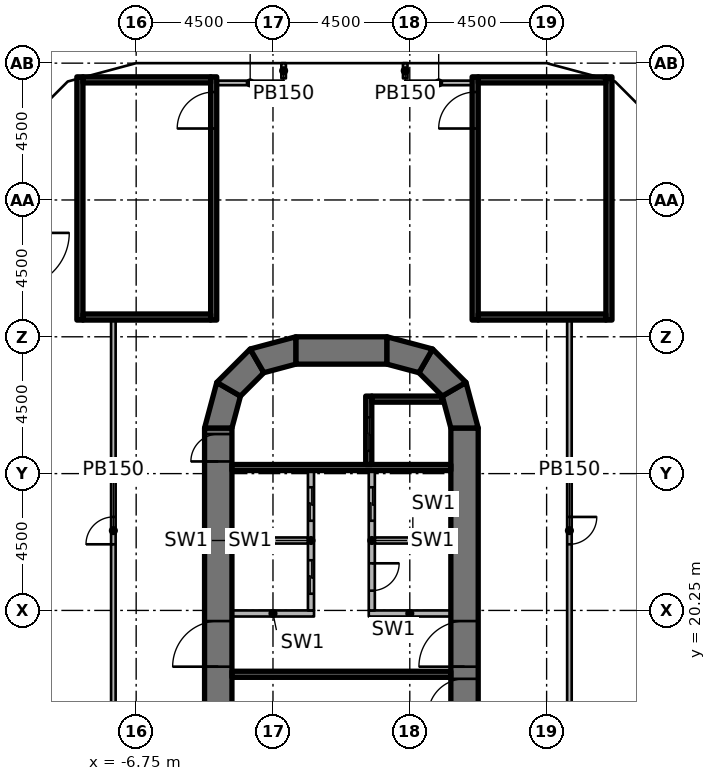
"""IFC4 building model, lengths in metres.
Left out: names, types, materials, properties, quantities, classifications, styles, units other than length and angle.
Written with IfcOpenShell. Run it as: python <this file> out.ifc"""

import sys

from ifc_helpers import new_model, si_unit, direction, frame, frame_2d, origin, origin_2d, place, context, subcontext, project, spatial, polyline, rectangle, outline, extrude, element, fill, save


model = new_model("IFC4")
c1 = context("Model", 3, precision=1e-05, world=origin(), true_north=direction((0.0, 1.0)))
c2 = subcontext(c1, "Body", "Model", "MODEL_VIEW")
j1 = project(units=[si_unit("LENGTHUNIT", "METRE"), si_unit("PLANEANGLEUNIT", "RADIAN")], contexts=[c1])
p1 = place(None, origin())
s1 = spatial("IfcSite", under=j1, at=p1, CompositionType="ELEMENT")
p2 = place(p1, origin())
s2 = spatial("IfcBuilding", under=s1, at=p2, CompositionType="ELEMENT")
p3 = place(p2, frame((0.0, 0.0, 22.0)))
s3 = spatial("IfcBuildingStorey", under=s2, at=p3, CompositionType="ELEMENT", Elevation=22.0)
for number, where, z_axis, x_axis in (
    (1, (-6.25, 20.25, 0.0), (0.0, 0.0, 1.0), (1.0, 0.0, 0.0)),
    (2, (-6.25, 24.65, 0.0), (0.0, 0.0, 1.0), (1.0, 0.0, 0.0)),
    (3, (-6.25, 26.7, 0.0), (0.0, 0.0, 1.0), (1.0, 0.0, 0.0)),
    (4, (-2.25, 33.11, 0.0), (0.0, 0.0, 1.0), (1.0, 0.0, 0.0)),
    (5, (2.25, 33.11, 0.0), (0.0, 0.0, 1.0), (1.0, 0.0, 0.0)),
    (6, (6.25, 20.25, 0.0), (0.0, 0.0, 1.0), (1.0, 0.0, 0.0)),
    (7, (6.25, 24.65, 0.0), (0.0, 0.0, 1.0), (1.0, 0.0, 0.0)),
    (8, (6.25, 26.7, 0.0), (0.0, 0.0, 1.0), (1.0, 0.0, 0.0)),
):
    element("IfcColumn", number, at=place(p3, frame(where, z_axis=z_axis, x_axis=x_axis)), inside=s3, PredefinedType="COLUMN", context=c2, shape_type="SweptSolid", body=[
        extrude(rectangle(XDim=1.2, YDim=1.2, at=origin_2d()), origin(), (0.0, 0.0, 1.0), 4.85),
    ])
p4 = place(p3, frame((-4.05, 11.25, 0.0), z_axis=(0.0, 0.0, 1.0), x_axis=(0.0, 1.0, 0.0)))
e9 = element("IfcWall", 9, at=p4, inside=s3, PredefinedType="SHEAR", context=c2, shape_type="SweptSolid", body=[
    extrude(rectangle(XDim=15.0, YDim=0.9, at=frame_2d((7.5, 0.0))), origin(), (0.0, 0.0, 1.0), 5.0),
])
p5 = place(p4, frame((7.15, 0.0, 0.0)))
e10 = element("IfcOpeningElement", 10, at=p5, cuts=e9, PredefinedType="OPENING", context=c2, shape_type="SweptSolid", body=[
    extrude(rectangle(XDim=1.5, YDim=2.3, at=frame_2d((0.75, 1.15))), frame((0.0, 0.46, 0.0), z_axis=(0.0, -1.0, 0.0), x_axis=(1.0, 0.0, 0.0)), (0.0, 0.0, 1.0), 0.92),
])
p6 = place(p4, frame((13.9, 0.0, 0.0)))
e11 = element("IfcOpeningElement", 11, at=p6, cuts=e9, PredefinedType="OPENING", context=c2, shape_type="SweptSolid", body=[
    extrude(rectangle(XDim=0.9, YDim=2.1, at=frame_2d((0.45, 1.05))), frame((0.0, 0.46, 0.0), z_axis=(0.0, -1.0, 0.0), x_axis=(1.0, 0.0, 0.0)), (0.0, 0.0, 1.0), 0.92),
])
p7 = place(p4, frame((1.15, 0.0, 0.0)))
e12 = element("IfcOpeningElement", 12, at=p7, cuts=e9, PredefinedType="OPENING", context=c2, shape_type="SweptSolid", body=[
    extrude(rectangle(XDim=1.2, YDim=2.1, at=frame_2d((0.6, 1.05))), frame((0.0, 0.46, 0.0), z_axis=(0.0, -1.0, 0.0), x_axis=(1.0, 0.0, 0.0)), (0.0, 0.0, 1.0), 0.92),
])
p8 = place(p3, frame((4.05, 11.25, 0.0), z_axis=(0.0, 0.0, 1.0), x_axis=(0.0, 1.0, 0.0)))
e13 = element("IfcWall", 13, at=p8, inside=s3, PredefinedType="SHEAR", context=c2, shape_type="SweptSolid", body=[
    extrude(rectangle(XDim=15.0, YDim=0.9, at=frame_2d((7.5, 0.0))), origin(), (0.0, 0.0, 1.0), 5.0),
])
p9 = place(p8, frame((7.15, 0.0, 0.0)))
e14 = element("IfcOpeningElement", 14, at=p9, cuts=e13, PredefinedType="OPENING", context=c2, shape_type="SweptSolid", body=[
    extrude(rectangle(XDim=1.5, YDim=2.3, at=frame_2d((0.75, 1.15))), frame((0.0, 0.46, 0.0), z_axis=(0.0, -1.0, 0.0), x_axis=(1.0, 0.0, 0.0)), (0.0, 0.0, 1.0), 0.92),
])
p10 = place(p8, frame((5.55, 0.0, 0.0)))
e15 = element("IfcOpeningElement", 15, at=p10, cuts=e13, PredefinedType="OPENING", context=c2, shape_type="SweptSolid", body=[
    extrude(rectangle(XDim=1.2, YDim=2.1, at=frame_2d((0.6, 1.05))), frame((0.0, 0.46, 0.0), z_axis=(0.0, -1.0, 0.0), x_axis=(1.0, 0.0, 0.0)), (0.0, 0.0, 1.0), 0.92),
])
p11 = place(p3, frame((-1.5, 28.8, 0.0), z_axis=(0.0, 0.0, 1.0), x_axis=(1.0, 0.0, 0.0)))
e16 = element("IfcWall", 16, at=p11, inside=s3, PredefinedType="SHEAR", context=c2, shape_type="SweptSolid", body=[
    extrude(rectangle(XDim=3.0, YDim=0.9, at=frame_2d((1.5, 0.0))), origin(), (0.0, 0.0, 1.0), 5.0),
])
p12 = place(p3, origin())
e17 = element("IfcWall", 17, at=p12, inside=s3, PredefinedType="SHEAR", context=c2, shape_type="SweptSolid", body=[
    extrude(outline(polyline([(-4.5, 26.25), (-4.098, 27.75), (-3.319, 27.3), (-3.6, 26.25), (-4.5, 26.25)])), origin(), (0.0, 0.0, 1.0), 5.0),
])
p13 = place(p3, origin())
e18 = element("IfcWall", 18, at=p13, inside=s3, PredefinedType="SHEAR", context=c2, shape_type="SweptSolid", body=[
    extrude(outline(polyline([(-4.098, 27.75), (-3.0, 28.848), (-2.55, 28.069), (-3.319, 27.3), (-4.098, 27.75)])), origin(), (0.0, 0.0, 1.0), 5.0),
])
p14 = place(p3, origin())
e19 = element("IfcWall", 19, at=p14, inside=s3, PredefinedType="SHEAR", context=c2, shape_type="SweptSolid", body=[
    extrude(outline(polyline([(-3.0, 28.848), (-1.5, 29.25), (-1.5, 28.35), (-2.55, 28.069), (-3.0, 28.848)])), origin(), (0.0, 0.0, 1.0), 5.0),
])
p15 = place(p3, origin())
e20 = element("IfcWall", 20, at=p15, inside=s3, PredefinedType="SHEAR", context=c2, shape_type="SweptSolid", body=[
    extrude(outline(polyline([(4.5, 26.25), (4.098, 27.75), (3.319, 27.3), (3.6, 26.25), (4.5, 26.25)])), origin(), (0.0, 0.0, 1.0), 5.0),
])
p16 = place(p3, origin())
e21 = element("IfcWall", 21, at=p16, inside=s3, PredefinedType="SHEAR", context=c2, shape_type="SweptSolid", body=[
    extrude(outline(polyline([(4.098, 27.75), (3.0, 28.848), (2.55, 28.069), (3.319, 27.3), (4.098, 27.75)])), origin(), (0.0, 0.0, 1.0), 5.0),
])
p17 = place(p3, origin())
e22 = element("IfcWall", 22, at=p17, inside=s3, PredefinedType="SHEAR", context=c2, shape_type="SweptSolid", body=[
    extrude(outline(polyline([(3.0, 28.848), (1.5, 29.25), (1.5, 28.35), (2.55, 28.069), (3.0, 28.848)])), origin(), (0.0, 0.0, 1.0), 5.0),
])
p18 = place(p3, frame((-3.6, 24.95, 0.0), z_axis=(0.0, 0.0, 1.0), x_axis=(1.0, 0.0, 0.0)))
e23 = element("IfcWall", 23, at=p18, inside=s3, PredefinedType="SHEAR", context=c2, shape_type="SweptSolid", body=[
    extrude(rectangle(XDim=7.2, YDim=0.2, at=frame_2d((3.6, 0.0))), origin(), (0.0, 0.0, 1.0), 4.85),
])
p19 = place(p3, frame((0.9, 27.3, 0.0), z_axis=(0.0, 0.0, 1.0), x_axis=(0.0, -1.0, 0.0)))
e24 = element("IfcWall", 24, at=p19, inside=s3, PredefinedType="SHEAR", context=c2, shape_type="SweptSolid", body=[
    extrude(rectangle(XDim=2.25, YDim=0.2, at=frame_2d((1.125, 0.0))), origin(), (0.0, 0.0, 1.0), 4.85),
])
p20 = place(p19, frame((0.7, 0.0, 0.0)))
e25 = element("IfcOpeningElement", 25, at=p20, cuts=e24, PredefinedType="OPENING", context=c2, shape_type="SweptSolid", body=[
    extrude(rectangle(XDim=1.1, YDim=2.3, at=frame_2d((0.55, 1.15))), frame((0.0, 0.11, 0.0), z_axis=(0.0, -1.0, 0.0), x_axis=(1.0, 0.0, 0.0)), (0.0, 0.0, 1.0), 0.22),
])
p21 = place(p3, origin())
e26 = element("IfcWall", 26, at=p21, inside=s3, PredefinedType="SHEAR", context=c2, shape_type="SweptSolid", body=[
    extrude(outline(polyline([(1.0, 27.1), (3.341, 27.1), (3.291, 27.284), (3.275, 27.3), (1.0, 27.3), (1.0, 27.1)])), origin(), (0.0, 0.0, 1.0), 4.85),
])
p22 = place(p3, frame((-3.6, 18.15, 0.0), z_axis=(0.0, 0.0, 1.0), x_axis=(1.0, 0.0, 0.0)))
e27 = element("IfcWall", 27, at=p22, inside=s3, PredefinedType="SHEAR", context=c2, shape_type="SweptSolid", body=[
    extrude(rectangle(XDim=7.2, YDim=0.2, at=frame_2d((3.6, 0.0))), origin(), (0.0, 0.0, 1.0), 4.85),
])
p23 = place(p3, frame((-3.6, 20.15, 0.0), z_axis=(0.0, 0.0, 1.0), x_axis=(1.0, 0.0, 0.0)))
e28 = element("IfcWall", 28, at=p23, inside=s3, PredefinedType="PARTITIONING", context=c2, shape_type="SweptSolid", body=[
    extrude(rectangle(XDim=2.7, YDim=0.2, at=frame_2d((1.35, 0.0))), origin(), (0.0, 0.0, 1.0), 4.85),
])
p24 = place(p3, frame((-1.0, 24.85, 0.0), z_axis=(0.0, 0.0, 1.0), x_axis=(0.0, -1.0, 0.0)))
e29 = element("IfcWall", 29, at=p24, inside=s3, PredefinedType="PARTITIONING", context=c2, shape_type="SweptSolid", body=[
    extrude(rectangle(XDim=4.6, YDim=0.2, at=frame_2d((2.3, 0.0))), origin(), (0.0, 0.0, 1.0), 4.85),
])
p25 = place(p24, frame((0.55, 0.0, 0.0)))
e30 = element("IfcOpeningElement", 30, at=p25, cuts=e29, PredefinedType="OPENING", context=c2, shape_type="SweptSolid", body=[
    extrude(rectangle(XDim=1.1, YDim=2.3, at=frame_2d((0.55, 1.15))), frame((0.0, 0.11, 0.0), z_axis=(0.0, -1.0, 0.0), x_axis=(1.0, 0.0, 0.0)), (0.0, 0.0, 1.0), 0.22),
])
p26 = place(p24, frame((2.95, 0.0, 0.0)))
e31 = element("IfcOpeningElement", 31, at=p26, cuts=e29, PredefinedType="OPENING", context=c2, shape_type="SweptSolid", body=[
    extrude(rectangle(XDim=1.1, YDim=2.3, at=frame_2d((0.55, 1.15))), frame((0.0, 0.11, 0.0), z_axis=(0.0, -1.0, 0.0), x_axis=(1.0, 0.0, 0.0)), (0.0, 0.0, 1.0), 0.22),
])
p27 = place(p3, frame((0.9, 20.15, 0.0), z_axis=(0.0, 0.0, 1.0), x_axis=(1.0, 0.0, 0.0)))
e32 = element("IfcWall", 32, at=p27, inside=s3, PredefinedType="PARTITIONING", context=c2, shape_type="SweptSolid", body=[
    extrude(rectangle(XDim=2.7, YDim=0.2, at=frame_2d((1.35, 0.0))), origin(), (0.0, 0.0, 1.0), 4.85),
])
p28 = place(p3, frame((1.0, 24.85, 0.0), z_axis=(0.0, 0.0, 1.0), x_axis=(0.0, -1.0, 0.0)))
e33 = element("IfcWall", 33, at=p28, inside=s3, PredefinedType="PARTITIONING", context=c2, shape_type="SweptSolid", body=[
    extrude(rectangle(XDim=4.6, YDim=0.2, at=frame_2d((2.3, 0.0))), origin(), (0.0, 0.0, 1.0), 4.85),
])
p29 = place(p28, frame((0.55, 0.0, 0.0)))
e34 = element("IfcOpeningElement", 34, at=p29, cuts=e33, PredefinedType="OPENING", context=c2, shape_type="SweptSolid", body=[
    extrude(rectangle(XDim=1.1, YDim=2.3, at=frame_2d((0.55, 1.15))), frame((0.0, 0.11, 0.0), z_axis=(0.0, -1.0, 0.0), x_axis=(1.0, 0.0, 0.0)), (0.0, 0.0, 1.0), 0.22),
])
p30 = place(p28, frame((3.05, 0.0, 0.0)))
e35 = element("IfcOpeningElement", 35, at=p30, cuts=e33, PredefinedType="OPENING", context=c2, shape_type="SweptSolid", body=[
    extrude(rectangle(XDim=0.9, YDim=2.1, at=frame_2d((0.45, 1.05))), frame((0.0, 0.11, 0.0), z_axis=(0.0, -1.0, 0.0), x_axis=(1.0, 0.0, 0.0)), (0.0, 0.0, 1.0), 0.22),
])
for number, where, z_axis, x_axis in (
    (36, (-3.6, 22.55, 0.0), (0.0, 0.0, 1.0), (1.0, 0.0, 0.0)),
    (37, (1.1, 22.55, 0.0), (0.0, 0.0, 1.0), (1.0, 0.0, 0.0)),
):
    element("IfcWall", number, at=place(p3, frame(where, z_axis=z_axis, x_axis=x_axis)), inside=s3, PredefinedType="PARTITIONING", context=c2, shape_type="SweptSolid", body=[
        extrude(rectangle(XDim=2.5, YDim=0.2, at=frame_2d((1.25, 0.0))), origin(), (0.0, 0.0, 1.0), 4.85),
    ])
p31 = place(p3, frame((-8.6, 29.8, 0.0), z_axis=(0.0, 0.0, 1.0), x_axis=(0.0, 1.0, 0.0)))
e38 = element("IfcWall", 38, at=p31, inside=s3, PredefinedType="SHEAR", context=c2, shape_type="SweptSolid", body=[
    extrude(rectangle(XDim=8.0, YDim=0.2, at=frame_2d((4.0, 0.0))), origin(), (0.0, 0.0, 1.0), 4.55),
])
p32 = place(p3, frame((-4.2, 29.8, 0.0), z_axis=(0.0, 0.0, 1.0), x_axis=(0.0, 1.0, 0.0)))
e39 = element("IfcWall", 39, at=p32, inside=s3, PredefinedType="SHEAR", context=c2, shape_type="SweptSolid", body=[
    extrude(rectangle(XDim=8.0, YDim=0.2, at=frame_2d((4.0, 0.0))), origin(), (0.0, 0.0, 1.0), 4.55),
])
p33 = place(p32, frame((6.3, 0.0, 0.0)))
e40 = element("IfcOpeningElement", 40, at=p33, cuts=e39, PredefinedType="OPENING", context=c2, shape_type="SweptSolid", body=[
    extrude(rectangle(XDim=1.2, YDim=2.1, at=frame_2d((0.6, 1.05))), frame((0.0, 0.11, 0.0), z_axis=(0.0, -1.0, 0.0), x_axis=(1.0, 0.0, 0.0)), (0.0, 0.0, 1.0), 0.22),
])
for number, where, z_axis, x_axis in (
    (41, (-8.5, 29.9, 0.0), (0.0, 0.0, 1.0), (1.0, 0.0, 0.0)),
    (42, (-8.5, 37.7, 0.0), (0.0, 0.0, 1.0), (1.0, 0.0, 0.0)),
):
    element("IfcWall", number, at=place(p3, frame(where, z_axis=z_axis, x_axis=x_axis)), inside=s3, PredefinedType="SHEAR", context=c2, shape_type="SweptSolid", body=[
        extrude(rectangle(XDim=4.2, YDim=0.2, at=frame_2d((2.1, 0.0))), origin(), (0.0, 0.0, 1.0), 4.55),
    ])
p34 = place(p3, frame((4.4, 29.8, 0.0), z_axis=(0.0, 0.0, 1.0), x_axis=(0.0, 1.0, 0.0)))
e43 = element("IfcWall", 43, at=p34, inside=s3, PredefinedType="SHEAR", context=c2, shape_type="SweptSolid", body=[
    extrude(rectangle(XDim=8.0, YDim=0.2, at=frame_2d((4.0, 0.0))), origin(), (0.0, 0.0, 1.0), 4.55),
])
p35 = place(p34, frame((6.3, 0.0, 0.0)))
e44 = element("IfcOpeningElement", 44, at=p35, cuts=e43, PredefinedType="OPENING", context=c2, shape_type="SweptSolid", body=[
    extrude(rectangle(XDim=1.2, YDim=2.1, at=frame_2d((0.6, 1.05))), frame((0.0, 0.11, 0.0), z_axis=(0.0, -1.0, 0.0), x_axis=(1.0, 0.0, 0.0)), (0.0, 0.0, 1.0), 0.22),
])
p36 = place(p3, frame((8.8, 29.8, 0.0), z_axis=(0.0, 0.0, 1.0), x_axis=(0.0, 1.0, 0.0)))
e45 = element("IfcWall", 45, at=p36, inside=s3, PredefinedType="SHEAR", context=c2, shape_type="SweptSolid", body=[
    extrude(rectangle(XDim=8.0, YDim=0.2, at=frame_2d((4.0, 0.0))), origin(), (0.0, 0.0, 1.0), 4.55),
])
for number, where, z_axis, x_axis in (
    (46, (4.5, 29.9, 0.0), (0.0, 0.0, 1.0), (1.0, 0.0, 0.0)),
    (47, (4.5, 37.7, 0.0), (0.0, 0.0, 1.0), (1.0, 0.0, 0.0)),
):
    element("IfcWall", number, at=place(p3, frame(where, z_axis=z_axis, x_axis=x_axis)), inside=s3, PredefinedType="SHEAR", context=c2, shape_type="SweptSolid", body=[
        extrude(rectangle(XDim=4.2, YDim=0.2, at=frame_2d((2.1, 0.0))), origin(), (0.0, 0.0, 1.0), 4.55),
    ])
p37 = place(p3, frame((-4.1, 37.6, 0.0), z_axis=(0.0, 0.0, 1.0), x_axis=(1.0, 0.0, 0.0)))
e48 = element("IfcWall", 48, at=p37, inside=s3, PredefinedType="PARTITIONING", context=c2, shape_type="SweptSolid", body=[
    extrude(rectangle(XDim=2.2, YDim=0.15, at=frame_2d((1.1, 0.0))), origin(), (0.0, 0.0, 1.0), 4.55),
])
p38 = place(p3, frame((2.1, 37.6, 0.0), z_axis=(0.0, 0.0, 1.0), x_axis=(1.0, 0.0, 0.0)))
e49 = element("IfcWall", 49, at=p38, inside=s3, PredefinedType="PARTITIONING", context=c2, shape_type="SweptSolid", body=[
    extrude(rectangle(XDim=2.2, YDim=0.15, at=frame_2d((1.1, 0.0))), origin(), (0.0, 0.0, 1.0), 4.55),
])
p39 = place(p3, frame((7.5, 30.0, 0.0), z_axis=(0.0, 0.0, 1.0), x_axis=(0.0, -1.0, 0.0)))
e50 = element("IfcWall", 50, at=p39, inside=s3, PredefinedType="PARTITIONING", context=c2, shape_type="SweptSolid", body=[
    extrude(rectangle(XDim=14.25, YDim=0.15, at=frame_2d((7.125, 0.0))), origin(), (0.0, 0.0, 1.0), 4.55),
])
p40 = place(p39, frame((6.675, 0.0, 0.0)))
e51 = element("IfcOpeningElement", 51, at=p40, cuts=e50, PredefinedType="OPENING", context=c2, shape_type="SweptSolid", body=[
    extrude(rectangle(XDim=0.9, YDim=2.1, at=frame_2d((0.45, 1.05))), frame((0.0, 0.085, 0.0), z_axis=(0.0, -1.0, 0.0), x_axis=(1.0, 0.0, 0.0)), (0.0, 0.0, 1.0), 0.17),
])
p41 = place(p3, frame((-7.5, 15.75, 0.0), z_axis=(0.0, 0.0, 1.0), x_axis=(0.0, 1.0, 0.0)))
e52 = element("IfcWall", 52, at=p41, inside=s3, PredefinedType="PARTITIONING", context=c2, shape_type="SweptSolid", body=[
    extrude(rectangle(XDim=14.25, YDim=0.15, at=frame_2d((7.125, 0.0))), origin(), (0.0, 0.0, 1.0), 4.55),
])
p42 = place(p41, frame((6.675, 0.0, 0.0)))
e53 = element("IfcOpeningElement", 53, at=p42, cuts=e52, PredefinedType="OPENING", context=c2, shape_type="SweptSolid", body=[
    extrude(rectangle(XDim=0.9, YDim=2.1, at=frame_2d((0.45, 1.05))), frame((0.0, 0.085, 0.0), z_axis=(0.0, -1.0, 0.0), x_axis=(1.0, 0.0, 0.0)), (0.0, 0.0, 1.0), 0.17),
])
for number, where, z_axis, x_axis in (
    (54, (2.1, 38.25, 0.0), (0.0, 0.0, 1.0), (0.0, -1.0, 0.0)),
    (55, (-1.9, 37.75, 0.0), (0.0, 0.0, 1.0), (0.0, 1.0, 0.0)),
):
    element("IfcWall", number, at=place(p3, frame(where, z_axis=z_axis, x_axis=x_axis)), inside=s3, PredefinedType="PARTITIONING", context=c2, shape_type="SweptSolid", body=[
        extrude(rectangle(XDim=0.5, YDim=0.15, at=frame_2d((0.25, 0.0))), origin(), (0.0, 0.0, 1.0), 4.55),
    ])
p43 = place(p5, origin())
e56 = element("IfcDoor", 56, at=p43, inside=s3, OperationType="DOUBLE_DOOR_SINGLE_SWING", PredefinedType="DOOR", context=c2, shape_type="SweptSolid", body=[
    extrude(rectangle(XDim=1.5, YDim=2.3, at=frame_2d((0.75, 1.15))), frame((0.0, 0.025, 0.0), z_axis=(0.0, -1.0, 0.0), x_axis=(1.0, 0.0, 0.0)), (0.0, 0.0, 1.0), 0.05),
])
fill(e10, e56)
p44 = place(p9, origin())
e57 = element("IfcDoor", 57, at=p44, inside=s3, OperationType="DOUBLE_DOOR_SINGLE_SWING", PredefinedType="DOOR", context=c2, shape_type="SweptSolid", body=[
    extrude(rectangle(XDim=1.5, YDim=2.3, at=frame_2d((0.75, 1.15))), frame((0.0, 0.025, 0.0), z_axis=(0.0, -1.0, 0.0), x_axis=(1.0, 0.0, 0.0)), (0.0, 0.0, 1.0), 0.05),
])
fill(e14, e57)
p45 = place(p6, origin())
e58 = element("IfcDoor", 58, at=p45, inside=s3, OperationType="SINGLE_SWING_RIGHT", PredefinedType="DOOR", context=c2, shape_type="SweptSolid", body=[
    extrude(rectangle(XDim=0.9, YDim=2.1, at=frame_2d((0.45, 1.05))), frame((0.0, 0.025, 0.0), z_axis=(0.0, -1.0, 0.0), x_axis=(1.0, 0.0, 0.0)), (0.0, 0.0, 1.0), 0.05),
])
fill(e11, e58)
p46 = place(p10, origin())
e59 = element("IfcDoor", 59, at=p46, inside=s3, OperationType="SINGLE_SWING_RIGHT", PredefinedType="DOOR", context=c2, shape_type="SweptSolid", body=[
    extrude(rectangle(XDim=1.2, YDim=2.1, at=frame_2d((0.6, 1.05))), frame((0.0, 0.025, 0.0), z_axis=(0.0, -1.0, 0.0), x_axis=(1.0, 0.0, 0.0)), (0.0, 0.0, 1.0), 0.05),
])
fill(e15, e59)
p47 = place(p20, origin())
e60 = element("IfcDoor", 60, at=p47, inside=s3, OperationType="DOUBLE_DOOR_SLIDING", PredefinedType="DOOR", context=c2, shape_type="SweptSolid", body=[
    extrude(rectangle(XDim=1.1, YDim=2.3, at=frame_2d((0.55, 1.15))), frame((0.0, 0.025, 0.0), z_axis=(0.0, -1.0, 0.0), x_axis=(1.0, 0.0, 0.0)), (0.0, 0.0, 1.0), 0.05),
])
fill(e25, e60)
p48 = place(p25, origin())
e61 = element("IfcDoor", 61, at=p48, inside=s3, OperationType="DOUBLE_DOOR_SLIDING", PredefinedType="DOOR", context=c2, shape_type="SweptSolid", body=[
    extrude(rectangle(XDim=1.1, YDim=2.3, at=frame_2d((0.55, 1.15))), frame((0.0, 0.025, 0.0), z_axis=(0.0, -1.0, 0.0), x_axis=(1.0, 0.0, 0.0)), (0.0, 0.0, 1.0), 0.05),
])
fill(e30, e61)
p49 = place(p26, origin())
e62 = element("IfcDoor", 62, at=p49, inside=s3, OperationType="DOUBLE_DOOR_SLIDING", PredefinedType="DOOR", context=c2, shape_type="SweptSolid", body=[
    extrude(rectangle(XDim=1.1, YDim=2.3, at=frame_2d((0.55, 1.15))), frame((0.0, 0.025, 0.0), z_axis=(0.0, -1.0, 0.0), x_axis=(1.0, 0.0, 0.0)), (0.0, 0.0, 1.0), 0.05),
])
fill(e31, e62)
p50 = place(p29, origin())
e63 = element("IfcDoor", 63, at=p50, inside=s3, OperationType="DOUBLE_DOOR_SLIDING", PredefinedType="DOOR", context=c2, shape_type="SweptSolid", body=[
    extrude(rectangle(XDim=1.1, YDim=2.3, at=frame_2d((0.55, 1.15))), frame((0.0, 0.025, 0.0), z_axis=(0.0, -1.0, 0.0), x_axis=(1.0, 0.0, 0.0)), (0.0, 0.0, 1.0), 0.05),
])
fill(e34, e63)
p51 = place(p30, origin())
e64 = element("IfcDoor", 64, at=p51, inside=s3, OperationType="SINGLE_SWING_RIGHT", PredefinedType="DOOR", context=c2, shape_type="SweptSolid", body=[
    extrude(rectangle(XDim=0.9, YDim=2.1, at=frame_2d((0.45, 1.05))), frame((0.0, 0.025, 0.0), z_axis=(0.0, -1.0, 0.0), x_axis=(1.0, 0.0, 0.0)), (0.0, 0.0, 1.0), 0.05),
])
fill(e35, e64)
p52 = place(p33, origin())
e65 = element("IfcDoor", 65, at=p52, inside=s3, OperationType="SINGLE_SWING_RIGHT", PredefinedType="DOOR", context=c2, shape_type="SweptSolid", body=[
    extrude(rectangle(XDim=1.2, YDim=2.1, at=frame_2d((0.6, 1.05))), frame((0.0, 0.025, 0.0), z_axis=(0.0, -1.0, 0.0), x_axis=(1.0, 0.0, 0.0)), (0.0, 0.0, 1.0), 0.05),
])
fill(e40, e65)
p53 = place(p35, origin())
e66 = element("IfcDoor", 66, at=p53, inside=s3, OperationType="SINGLE_SWING_LEFT", PredefinedType="DOOR", context=c2, shape_type="SweptSolid", body=[
    extrude(rectangle(XDim=1.2, YDim=2.1, at=frame_2d((0.6, 1.05))), frame((0.0, 0.025, 0.0), z_axis=(0.0, -1.0, 0.0), x_axis=(1.0, 0.0, 0.0)), (0.0, 0.0, 1.0), 0.05),
])
fill(e44, e66)
p54 = place(p40, origin())
e67 = element("IfcDoor", 67, at=p54, inside=s3, OperationType="SINGLE_SWING_LEFT", PredefinedType="DOOR", context=c2, shape_type="SweptSolid", body=[
    extrude(rectangle(XDim=0.9, YDim=2.1, at=frame_2d((0.45, 1.05))), frame((0.0, 0.025, 0.0), z_axis=(0.0, -1.0, 0.0), x_axis=(1.0, 0.0, 0.0)), (0.0, 0.0, 1.0), 0.05),
])
fill(e51, e67)
p55 = place(p42, origin())
e68 = element("IfcDoor", 68, at=p55, inside=s3, OperationType="SINGLE_SWING_LEFT", PredefinedType="DOOR", context=c2, shape_type="SweptSolid", body=[
    extrude(rectangle(XDim=0.9, YDim=2.1, at=frame_2d((0.45, 1.05))), frame((0.0, 0.025, 0.0), z_axis=(0.0, -1.0, 0.0), x_axis=(1.0, 0.0, 0.0)), (0.0, 0.0, 1.0), 0.05),
])
fill(e53, e68)
save(model, sys.argv[1])
